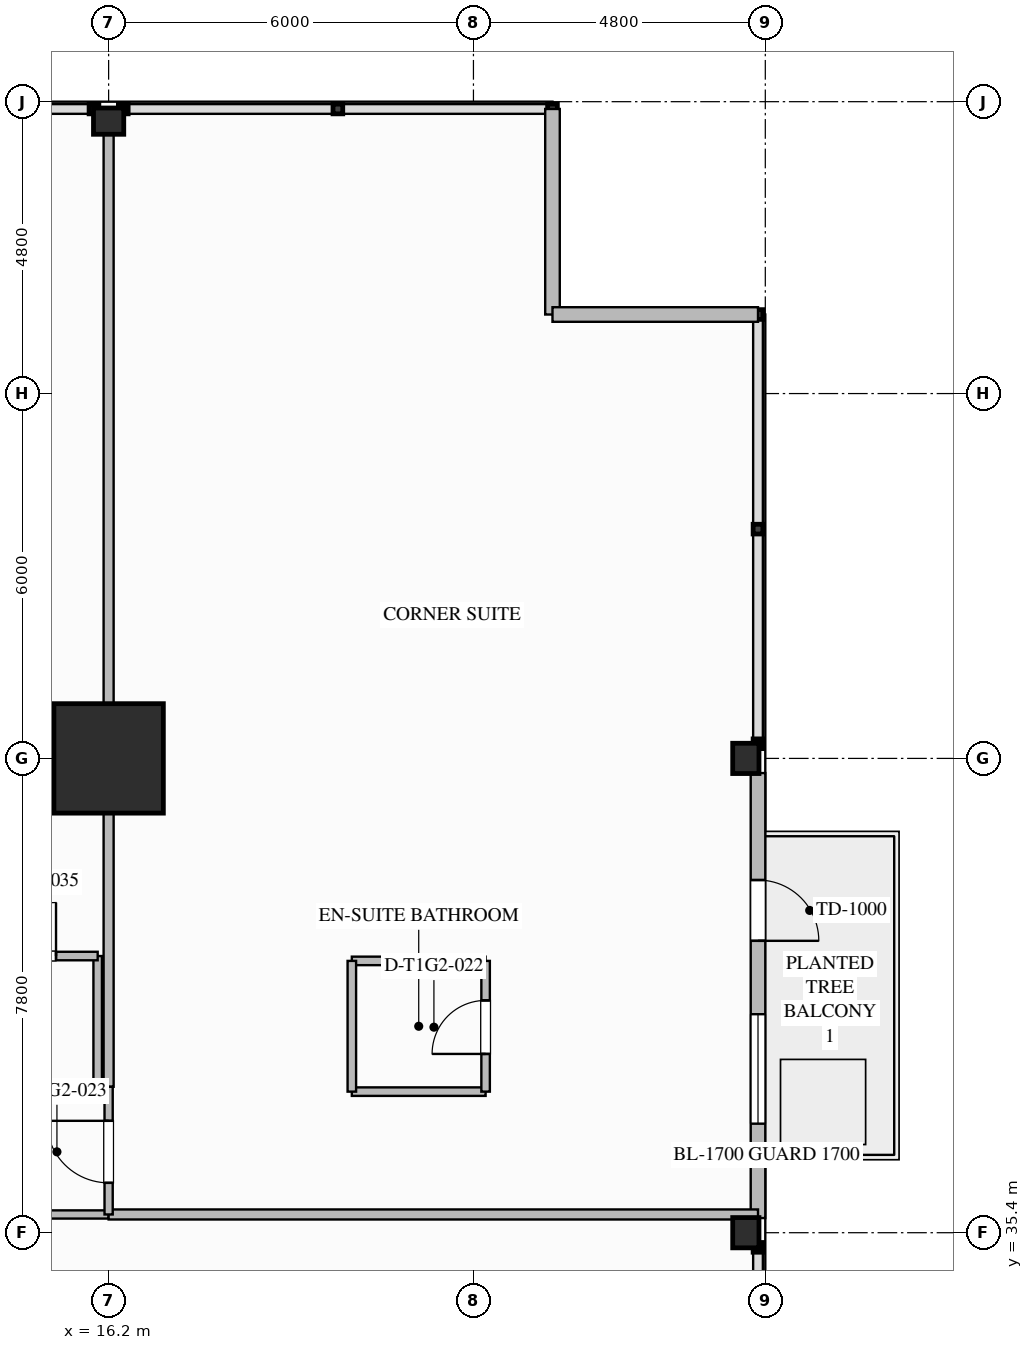
"""IFC4 building model, lengths in metres.
Left out: names, types, materials, properties, quantities, classifications, styles, units other than length and angle.
Written with IfcOpenShell. Run it as: python <this file> out.ifc"""

import sys

from ifc_helpers import new_model, si_unit, direction, frame, frame_2d, origin, origin_2d, place, context, subcontext, project, spatial, rectangle, i_section, extrude, element, fill, save


model = new_model("IFC4")
c1 = context("Model", 3, precision=1e-05, world=origin(), true_north=direction((0.0, 1.0)))
c2 = subcontext(c1, "Body", "Model", "MODEL_VIEW")
j1 = project(units=[si_unit("LENGTHUNIT", "METRE"), si_unit("PLANEANGLEUNIT", "RADIAN")], contexts=[c1])
p1 = place(None, origin())
s1 = spatial("IfcSite", under=j1, at=p1, CompositionType="ELEMENT")
p2 = place(p1, origin())
s2 = spatial("IfcBuilding", under=s1, at=p2, CompositionType="ELEMENT")
p3 = place(p2, frame((0.0, 0.0, 43.7)))
s3 = spatial("IfcBuildingStorey", under=s2, at=p3, CompositionType="ELEMENT", Elevation=43.7)
p4 = place(p3, frame((16.2, 43.2, 0.0), z_axis=(0.0, 0.0, 1.0), x_axis=(1.0, 0.0, 0.0)))
e1 = element("IfcColumn", 1, at=p4, inside=s3, PredefinedType="COLUMN", context=c2, shape_type="SweptSolid", body=[
    extrude(rectangle(XDim=1.8, YDim=1.8, at=origin_2d()), origin(), (0.0, 0.0, 1.0), 3.5),
])
for number, where, z_axis, x_axis in (
    (2, (26.68, 35.4, 0.0), (0.0, 0.0, 1.0), (1.0, 0.0, 0.0)),
    (3, (26.68, 43.2, 0.0), (0.0, 0.0, 1.0), (1.0, 0.0, 0.0)),
    (4, (16.2, 53.68, 0.0), (0.0, 0.0, 1.0), (0.0, 1.0, 0.0)),
):
    element("IfcColumn", number, at=place(p3, frame(where, z_axis=z_axis, x_axis=x_axis)), inside=s3, PredefinedType="COLUMN", context=c2, shape_type="SweptSolid", body=[
        extrude(i_section(OverallWidth=0.432, OverallDepth=0.498, WebThickness=0.056, FlangeThickness=0.089, FilletRadius=0.03, at=origin_2d()), origin(), (0.0, 0.0, 1.0), 3.497),
    ])
p5 = place(p3, frame((26.88, 42.959, 0.0), z_axis=(0.0, 0.0, 1.0), x_axis=(0.0, -1.0, 0.0)))
e5 = element("IfcWall", 5, at=p5, inside=s3, PredefinedType="STANDARD", context=c2, shape_type="SweptSolid", body=[
    extrude(rectangle(XDim=7.318, YDim=0.24, at=frame_2d((3.659, 0.0))), origin(), (0.0, 0.0, 1.0), 2.629),
])
p6 = place(p5, frame((1.759, 0.0, 0.0)))
e6 = element("IfcOpeningElement", 6, at=p6, cuts=e5, PredefinedType="OPENING", context=c2, shape_type="SweptSolid", body=[
    extrude(rectangle(XDim=1.0, YDim=2.2, at=frame_2d((0.5, 1.1))), frame((0.0, 0.13, 0.0), z_axis=(0.0, -1.0, 0.0), x_axis=(1.0, 0.0, 0.0)), (0.0, 0.0, 1.0), 0.26),
])
p7 = place(p5, frame((3.966, 0.0, 0.75)))
e7 = element("IfcOpeningElement", 7, at=p7, cuts=e5, PredefinedType="OPENING", context=c2, shape_type="SweptSolid", body=[
    extrude(rectangle(XDim=1.8, YDim=1.779, at=frame_2d((0.9, 0.89))), frame((0.0, 0.13, 0.0), z_axis=(0.0, -1.0, 0.0), x_axis=(1.0, 0.0, 0.0)), (0.0, 0.0, 1.0), 0.26),
])
for number, where, z_axis, x_axis in (
    (8, (23.5, 53.88, 0.0), (0.0, 0.0, 1.0), (0.0, -1.0, 0.0)),
    (9, (23.5, 50.5, 0.0), (0.0, 0.0, 1.0), (1.0, 0.0, 0.0)),
):
    element("IfcWall", number, at=place(p3, frame(where, z_axis=z_axis, x_axis=x_axis)), inside=s3, PredefinedType="STANDARD", context=c2, shape_type="SweptSolid", body=[
        extrude(rectangle(XDim=3.38, YDim=0.24, at=frame_2d((1.69, 0.0))), origin(), (0.0, 0.0, 1.0), 3.24),
    ])
p8 = place(p3, frame((-16.2, 37.8, 0.0), z_axis=(0.0, 0.0, 1.0), x_axis=(1.0, 0.0, 0.0)))
e10 = element("IfcWall", 10, at=p8, inside=s3, PredefinedType="PARTITIONING", context=c2, shape_type="SweptSolid", body=[
    extrude(rectangle(XDim=32.4, YDim=0.135, at=frame_2d((16.2, 0.0))), origin(), (0.0, 0.0, 1.0), 3.24),
])
p9 = place(p8, frame((1.719, 0.0, 0.0)))
e11 = element("IfcOpeningElement", 11, at=p9, cuts=e10, PredefinedType="OPENING", context=c2, shape_type="SweptSolid", body=[
    extrude(rectangle(XDim=1.26, YDim=2.2, at=frame_2d((0.63, 1.1))), frame((0.0, 0.077, 0.0), z_axis=(0.0, -1.0, 0.0), x_axis=(1.0, 0.0, 0.0)), (0.0, 0.0, 1.0), 0.155),
])
p10 = place(p8, frame((10.143, 0.0, 0.0)))
e12 = element("IfcOpeningElement", 12, at=p10, cuts=e10, PredefinedType="OPENING", context=c2, shape_type="SweptSolid", body=[
    extrude(rectangle(XDim=1.26, YDim=2.2, at=frame_2d((0.63, 1.1))), frame((0.0, 0.077, 0.0), z_axis=(0.0, -1.0, 0.0), x_axis=(1.0, 0.0, 0.0)), (0.0, 0.0, 1.0), 0.155),
])
p11 = place(p8, frame((18.567, 0.0, 0.0)))
e13 = element("IfcOpeningElement", 13, at=p11, cuts=e10, PredefinedType="OPENING", context=c2, shape_type="SweptSolid", body=[
    extrude(rectangle(XDim=1.26, YDim=2.2, at=frame_2d((0.63, 1.1))), frame((0.0, 0.077, 0.0), z_axis=(0.0, -1.0, 0.0), x_axis=(1.0, 0.0, 0.0)), (0.0, 0.0, 1.0), 0.155),
])
p12 = place(p8, frame((26.343, 0.0, 0.0)))
e14 = element("IfcOpeningElement", 14, at=p12, cuts=e10, PredefinedType="OPENING", context=c2, shape_type="SweptSolid", body=[
    extrude(rectangle(XDim=1.26, YDim=2.2, at=frame_2d((0.63, 1.1))), frame((0.0, 0.077, 0.0), z_axis=(0.0, -1.0, 0.0), x_axis=(1.0, 0.0, 0.0)), (0.0, 0.0, 1.0), 0.155),
])
p13 = place(p3, frame((10.8, 35.7, 0.0), z_axis=(0.0, 0.0, 1.0), x_axis=(1.0, 0.0, 0.0)))
e15 = element("IfcWall", 15, at=p13, inside=s3, PredefinedType="PARTITIONING", context=c2, shape_type="SweptSolid", body=[
    extrude(rectangle(XDim=5.4, YDim=0.135, at=frame_2d((2.7, 0.0))), origin(), (0.0, 0.0, 1.0), 3.24),
])
p14 = place(p3, frame((16.2, 37.8, 0.0), z_axis=(0.0, 0.0, 1.0), x_axis=(0.0, 1.0, 0.0)))
e16 = element("IfcWall", 16, at=p14, inside=s3, PredefinedType="PARTITIONING", context=c2, shape_type="SweptSolid", body=[
    extrude(rectangle(XDim=16.08, YDim=0.165, at=frame_2d((8.04, 0.0))), origin(), (0.0, 0.0, 1.0), 2.298),
])
p15 = place(p3, frame((16.2, 35.7, 0.0), z_axis=(0.0, 0.0, 1.0), x_axis=(1.0, 0.0, 0.0)))
e17 = element("IfcWall", 17, at=p15, inside=s3, PredefinedType="PARTITIONING", context=c2, shape_type="SweptSolid", body=[
    extrude(rectangle(XDim=10.68, YDim=0.165, at=frame_2d((5.34, 0.0))), origin(), (0.0, 0.0, 1.0), 2.298),
])
p16 = place(p3, frame((16.2, 35.7, 0.0), z_axis=(0.0, 0.0, 1.0), x_axis=(0.0, 1.0, 0.0)))
e18 = element("IfcWall", 18, at=p16, inside=s3, PredefinedType="PARTITIONING", context=c2, shape_type="SweptSolid", body=[
    extrude(rectangle(XDim=2.1, YDim=0.135, at=frame_2d((1.05, 0.0))), origin(), (0.0, 0.0, 1.0), 2.298),
])
p17 = place(p16, frame((0.52, 0.0, 0.0)))
e19 = element("IfcOpeningElement", 19, at=p17, cuts=e18, PredefinedType="OPENING", context=c2, shape_type="SweptSolid", body=[
    extrude(rectangle(XDim=1.02, YDim=2.15, at=frame_2d((0.51, 1.075))), frame((0.0, 0.077, 0.0), z_axis=(0.0, -1.0, 0.0), x_axis=(1.0, 0.0, 0.0)), (0.0, 0.0, 1.0), 0.155),
])
for number, where, z_axis, x_axis in (
    (20, (20.2, 37.72, 0.0), (0.0, 0.0, 1.0), (1.0, 0.0, 0.0)),
    (21, (20.2, 39.87, 0.0), (0.0, 0.0, 1.0), (1.0, 0.0, 0.0)),
):
    element("IfcWall", number, at=place(p3, frame(where, z_axis=z_axis, x_axis=x_axis)), inside=s3, PredefinedType="PLUMBINGWALL", context=c2, shape_type="SweptSolid", body=[
        extrude(rectangle(XDim=2.2, YDim=0.14, at=frame_2d((1.1, 0.0))), origin(), (0.0, 0.0, 1.0), 3.24),
    ])
p18 = place(p3, frame((20.2, 37.72, 0.0), z_axis=(0.0, 0.0, 1.0), x_axis=(0.0, 1.0, 0.0)))
e22 = element("IfcWall", 22, at=p18, inside=s3, PredefinedType="PLUMBINGWALL", context=c2, shape_type="SweptSolid", body=[
    extrude(rectangle(XDim=2.15, YDim=0.14, at=frame_2d((1.075, 0.0))), origin(), (0.0, 0.0, 1.0), 3.24),
])
p19 = place(p3, frame((22.4, 37.72, 0.0), z_axis=(0.0, 0.0, 1.0), x_axis=(0.0, 1.0, 0.0)))
e23 = element("IfcWall", 23, at=p19, inside=s3, PredefinedType="PLUMBINGWALL", context=c2, shape_type="SweptSolid", body=[
    extrude(rectangle(XDim=2.15, YDim=0.14, at=frame_2d((1.075, 0.0))), origin(), (0.0, 0.0, 1.0), 3.24),
])
p20 = place(p19, frame((0.62, 0.0, 0.0)))
e24 = element("IfcOpeningElement", 24, at=p20, cuts=e23, PredefinedType="OPENING", context=c2, shape_type="SweptSolid", body=[
    extrude(rectangle(XDim=0.88, YDim=2.1, at=frame_2d((0.44, 1.05))), frame((0.0, 0.08, 0.0), z_axis=(0.0, -1.0, 0.0), x_axis=(1.0, 0.0, 0.0)), (0.0, 0.0, 1.0), 0.16),
])
p21 = place(p3, frame((16.02, 37.8, 0.0), z_axis=(0.0, 0.0, 1.0), x_axis=(0.0, 1.0, 0.0)))
e25 = element("IfcWall", 25, at=p21, inside=s3, PredefinedType="PLUMBINGWALL", context=c2, shape_type="SweptSolid", body=[
    extrude(rectangle(XDim=2.15, YDim=0.14, at=frame_2d((1.075, 0.0))), origin(), (0.0, 0.0, 1.0), 2.298),
])
p22 = place(p3, frame((13.77, 39.95, 0.0), z_axis=(0.0, 0.0, 1.0), x_axis=(1.0, 0.0, 0.0)))
e26 = element("IfcWall", 26, at=p22, inside=s3, PredefinedType="PLUMBINGWALL", context=c2, shape_type="SweptSolid", body=[
    extrude(rectangle(XDim=2.25, YDim=0.14, at=frame_2d((1.125, 0.0))), origin(), (0.0, 0.0, 1.0), 3.24),
])
p23 = place(p22, frame((0.685, 0.0, 0.0)))
e27 = element("IfcOpeningElement", 27, at=p23, cuts=e26, PredefinedType="OPENING", context=c2, shape_type="SweptSolid", body=[
    extrude(rectangle(XDim=0.88, YDim=2.1, at=frame_2d((0.44, 1.05))), frame((0.0, 0.08, 0.0), z_axis=(0.0, -1.0, 0.0), x_axis=(1.0, 0.0, 0.0)), (0.0, 0.0, 1.0), 0.16),
])
p24 = place(p6, origin())
e28 = element("IfcDoor", 28, at=p24, inside=s3, OperationType="SINGLE_SWING_RIGHT", PredefinedType="DOOR", context=c2, shape_type="SweptSolid", body=[
    extrude(rectangle(XDim=1.0, YDim=2.2, at=frame_2d((0.5, 1.1))), frame((0.0, 0.025, 0.0), z_axis=(0.0, -1.0, 0.0), x_axis=(1.0, 0.0, 0.0)), (0.0, 0.0, 1.0), 0.05),
])
fill(e6, e28)
p25 = place(p7, origin())
e29 = element("IfcWindow", 29, at=p25, inside=s3, PartitioningType="SINGLE_PANEL", PredefinedType="WINDOW", context=c2, shape_type="SweptSolid", body=[
    extrude(rectangle(XDim=1.8, YDim=1.779, at=frame_2d((0.9, 0.89))), frame((0.0, 0.03, 0.0), z_axis=(0.0, -1.0, 0.0), x_axis=(1.0, 0.0, 0.0)), (0.0, 0.0, 1.0), 0.06),
])
fill(e7, e29)
p26 = place(p20, origin())
e30 = element("IfcDoor", 30, at=p26, inside=s3, OperationType="SINGLE_SWING_LEFT", PredefinedType="DOOR", context=c2, shape_type="SweptSolid", body=[
    extrude(rectangle(XDim=0.88, YDim=2.1, at=frame_2d((0.44, 1.05))), frame((0.0, 0.025, 0.0), z_axis=(0.0, -1.0, 0.0), x_axis=(1.0, 0.0, 0.0)), (0.0, 0.0, 1.0), 0.05),
])
fill(e24, e30)
p27 = place(p17, origin())
e31 = element("IfcDoor", 31, at=p27, inside=s3, OperationType="SINGLE_SWING_RIGHT", PredefinedType="DOOR", context=c2, shape_type="SweptSolid", body=[
    extrude(rectangle(XDim=1.02, YDim=2.15, at=frame_2d((0.51, 1.075))), frame((0.0, 0.025, 0.0), z_axis=(0.0, -1.0, 0.0), x_axis=(1.0, 0.0, 0.0)), (0.0, 0.0, 1.0), 0.05),
])
fill(e19, e31)
p28 = place(p23, origin())
e32 = element("IfcDoor", 32, at=p28, inside=s3, OperationType="SINGLE_SWING_RIGHT", PredefinedType="DOOR", context=c2, shape_type="SweptSolid", body=[
    extrude(rectangle(XDim=0.88, YDim=2.1, at=frame_2d((0.44, 1.05))), frame((0.0, 0.025, 0.0), z_axis=(0.0, -1.0, 0.0), x_axis=(1.0, 0.0, 0.0)), (0.0, 0.0, 1.0), 0.05),
])
fill(e27, e32)
save(model, sys.argv[1])
